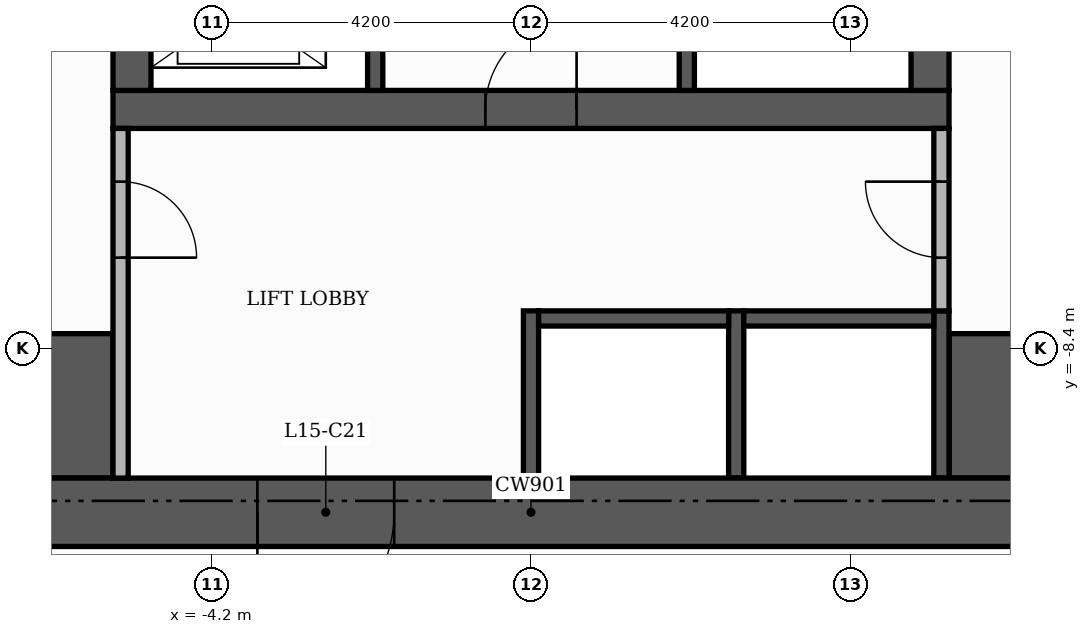
"""IFC4 building model, lengths in metres.
Left out: names, types, materials, properties, quantities, classifications, styles, units other than length and angle.
Written with IfcOpenShell. Run it as: python <this file> out.ifc"""

import sys

from ifc_helpers import new_model, si_unit, direction, frame, frame_2d, origin, place, context, subcontext, project, spatial, rectangle, extrude, element, fill, save


model = new_model("IFC4")
c1 = context("Model", 3, precision=1e-05, world=origin(), true_north=direction((0.0, 1.0)))
c2 = subcontext(c1, "Body", "Model", "MODEL_VIEW")
j1 = project(units=[si_unit("LENGTHUNIT", "METRE"), si_unit("PLANEANGLEUNIT", "RADIAN")], contexts=[c1])
p1 = place(None, origin())
s1 = spatial("IfcSite", under=j1, at=p1, CompositionType="ELEMENT")
p2 = place(p1, origin())
s2 = spatial("IfcBuilding", under=s1, at=p2, CompositionType="ELEMENT")
p3 = place(p2, frame((0.0, 0.0, 66.0)))
s3 = spatial("IfcBuildingStorey", under=s2, at=p3, CompositionType="ELEMENT", Elevation=66.0)
p4 = place(p3, frame((-5.5, -5.25, 0.0), z_axis=(0.0, 0.0, 1.0), x_axis=(1.0, 0.0, 0.0)))
e1 = element("IfcWall", 1, at=p4, inside=s3, PredefinedType="SHEAR", context=c2, shape_type="SweptSolid", body=[
    extrude(rectangle(XDim=11.0, YDim=0.5, at=frame_2d((5.5, 0.0))), origin(), (0.0, 0.0, 1.0), 3.48),
])
p5 = place(p4, frame((4.9, 0.0, 0.0)))
e2 = element("IfcOpeningElement", 2, at=p5, cuts=e1, PredefinedType="OPENING", context=c2, shape_type="SweptSolid", body=[
    extrude(rectangle(XDim=1.2, YDim=2.1, at=frame_2d((0.6, 1.05))), frame((0.0, 0.26, 0.0), z_axis=(0.0, -1.0, 0.0), x_axis=(1.0, 0.0, 0.0)), (0.0, 0.0, 1.0), 0.52),
])
for number, where, z_axis, x_axis in (
    (3, (-5.25, -5.0, 0.0), (0.0, 0.0, 1.0), (0.0, 1.0, 0.0)),
    (4, (5.25, -5.0, 0.0), (0.0, 0.0, 1.0), (0.0, 1.0, 0.0)),
):
    element("IfcWall", number, at=place(p3, frame(where, z_axis=z_axis, x_axis=x_axis)), inside=s3, PredefinedType="SHEAR", context=c2, shape_type="SweptSolid", body=[
        extrude(rectangle(XDim=10.5, YDim=0.5, at=frame_2d((5.25, 0.0))), origin(), (0.0, 0.0, 1.0), 3.48),
    ])
for number, where, z_axis, x_axis in (
    (5, (-10.1, -9.15, 0.0), (0.0, 0.0, 1.0), (1.0, 0.0, 0.0)),
    (6, (5.5, -9.15, 0.0), (0.0, 0.0, 1.0), (1.0, 0.0, 0.0)),
):
    element("IfcWall", number, at=place(p3, frame(where, z_axis=z_axis, x_axis=x_axis)), inside=s3, PredefinedType="SHEAR", context=c2, shape_type="SweptSolid", body=[
        extrude(rectangle(XDim=4.6, YDim=1.9, at=frame_2d((2.3, 0.0))), origin(), (0.0, 0.0, 1.0), 3.48),
    ])
p6 = place(p3, frame((2.05, -5.0, 0.0), z_axis=(0.0, 0.0, 1.0), x_axis=(0.0, 1.0, 0.0)))
e7 = element("IfcWall", 7, at=p6, inside=s3, PredefinedType="SHEAR", context=c2, shape_type="SweptSolid", body=[
    extrude(rectangle(XDim=6.6, YDim=0.2, at=frame_2d((3.3, 0.0))), origin(), (0.0, 0.0, 1.0), 3.48),
])
p7 = place(p6, frame((5.25, 0.0, 0.0)))
e8 = element("IfcOpeningElement", 8, at=p7, cuts=e7, PredefinedType="OPENING", context=c2, shape_type="SweptSolid", body=[
    extrude(rectangle(XDim=1.0, YDim=2.1, at=frame_2d((0.5, 1.05))), frame((0.0, 0.11, 0.0), z_axis=(0.0, -1.0, 0.0), x_axis=(1.0, 0.0, 0.0)), (0.0, 0.0, 1.0), 0.22),
])
for number, where, z_axis, x_axis in (
    (9, (0.0, -10.1, 0.0), (0.0, 0.0, 1.0), (0.0, 1.0, 0.0)),
    (10, (2.7, -10.1, 0.0), (0.0, 0.0, 1.0), (0.0, 1.0, 0.0)),
    (11, (5.4, -10.1, 0.0), (0.0, 0.0, 1.0), (0.0, 1.0, 0.0)),
):
    element("IfcWall", number, at=place(p3, frame(where, z_axis=z_axis, x_axis=x_axis)), inside=s3, PredefinedType="SHEAR", context=c2, shape_type="SweptSolid", body=[
        extrude(rectangle(XDim=2.2, YDim=0.2, at=frame_2d((1.1, 0.0))), origin(), (0.0, 0.0, 1.0), 3.48),
    ])
for number, where, z_axis, x_axis in (
    (12, (0.1, -8.0, 0.0), (0.0, 0.0, 1.0), (1.0, 0.0, 0.0)),
    (13, (2.8, -8.0, 0.0), (0.0, 0.0, 1.0), (1.0, 0.0, 0.0)),
):
    element("IfcWall", number, at=place(p3, frame(where, z_axis=z_axis, x_axis=x_axis)), inside=s3, PredefinedType="SHEAR", context=c2, shape_type="SweptSolid", body=[
        extrude(rectangle(XDim=2.5, YDim=0.2, at=frame_2d((1.25, 0.0))), origin(), (0.0, 0.0, 1.0), 3.48),
    ])
p8 = place(p3, frame((-2.05, -5.0, 0.0), z_axis=(0.0, 0.0, 1.0), x_axis=(0.0, 1.0, 0.0)))
e14 = element("IfcWall", 14, at=p8, inside=s3, PredefinedType="SHEAR", context=c2, shape_type="SweptSolid", body=[
    extrude(rectangle(XDim=3.4, YDim=0.2, at=frame_2d((1.7, 0.0))), origin(), (0.0, 0.0, 1.0), 3.48),
])
p9 = place(p8, frame((0.55, 0.0, 0.0)))
e15 = element("IfcOpeningElement", 15, at=p9, cuts=e14, PredefinedType="OPENING", context=c2, shape_type="SweptSolid", body=[
    extrude(rectangle(XDim=1.1, YDim=2.1, at=frame_2d((0.55, 1.05))), frame((0.0, 0.11, 0.0), z_axis=(0.0, -1.0, 0.0), x_axis=(1.0, 0.0, 0.0)), (0.0, 0.0, 1.0), 0.22),
])
p10 = place(p8, frame((2.45, 0.0, 0.0)))
e16 = element("IfcOpeningElement", 16, at=p10, cuts=e14, PredefinedType="OPENING", context=c2, shape_type="SweptSolid", body=[
    extrude(rectangle(XDim=0.8, YDim=2.1, at=frame_2d((0.4, 1.05))), frame((0.0, 0.11, 0.0), z_axis=(0.0, -1.0, 0.0), x_axis=(1.0, 0.0, 0.0)), (0.0, 0.0, 1.0), 0.22),
])
p11 = place(p3, frame((-11.0, -10.55, 0.0), z_axis=(0.0, 0.0, 1.0), x_axis=(1.0, 0.0, 0.0)))
e17 = element("IfcWall", 17, at=p11, inside=s3, PredefinedType="SHEAR", context=c2, shape_type="SweptSolid", body=[
    extrude(rectangle(XDim=22.0, YDim=0.9, at=frame_2d((11.0, 0.0))), origin(), (0.0, 0.0, 1.0), 3.48),
])
p12 = place(p11, frame((7.4, 0.0, 0.0)))
e18 = element("IfcOpeningElement", 18, at=p12, cuts=e17, PredefinedType="OPENING", context=c2, shape_type="SweptSolid", body=[
    extrude(rectangle(XDim=1.8, YDim=2.2, at=frame_2d((0.9, 1.1))), frame((0.0, 0.46, 0.0), z_axis=(0.0, -1.0, 0.0), x_axis=(1.0, 0.0, 0.0)), (0.0, 0.0, 1.0), 0.92),
])
p13 = place(p3, frame((-5.4, -10.1, 0.0), z_axis=(0.0, 0.0, 1.0), x_axis=(0.0, 1.0, 0.0)))
e19 = element("IfcWall", 19, at=p13, inside=s3, PredefinedType="PARTITIONING", context=c2, shape_type="SweptSolid", body=[
    extrude(rectangle(XDim=4.6, YDim=0.2, at=frame_2d((2.3, 0.0))), origin(), (0.0, 0.0, 1.0), 3.48),
])
p14 = place(p13, frame((2.9, 0.0, 0.0)))
e20 = element("IfcOpeningElement", 20, at=p14, cuts=e19, PredefinedType="OPENING", context=c2, shape_type="SweptSolid", body=[
    extrude(rectangle(XDim=1.0, YDim=2.1, at=frame_2d((0.5, 1.05))), frame((0.0, 0.11, 0.0), z_axis=(0.0, -1.0, 0.0), x_axis=(1.0, 0.0, 0.0)), (0.0, 0.0, 1.0), 0.22),
])
p15 = place(p3, frame((5.4, -7.9, 0.0), z_axis=(0.0, 0.0, 1.0), x_axis=(0.0, 1.0, 0.0)))
e21 = element("IfcWall", 21, at=p15, inside=s3, PredefinedType="PARTITIONING", context=c2, shape_type="SweptSolid", body=[
    extrude(rectangle(XDim=2.4, YDim=0.2, at=frame_2d((1.2, 0.0))), origin(), (0.0, 0.0, 1.0), 3.48),
])
p16 = place(p15, frame((0.7, 0.0, 0.0)))
e22 = element("IfcOpeningElement", 22, at=p16, cuts=e21, PredefinedType="OPENING", context=c2, shape_type="SweptSolid", body=[
    extrude(rectangle(XDim=1.0, YDim=2.1, at=frame_2d((0.5, 1.05))), frame((0.0, 0.11, 0.0), z_axis=(0.0, -1.0, 0.0), x_axis=(1.0, 0.0, 0.0)), (0.0, 0.0, 1.0), 0.22),
])
p17 = place(p5, origin())
e23 = element("IfcDoor", 23, at=p17, inside=s3, OperationType="SINGLE_SWING_RIGHT", PredefinedType="DOOR", context=c2, shape_type="SweptSolid", body=[
    extrude(rectangle(XDim=1.2, YDim=2.1, at=frame_2d((0.6, 1.05))), frame((0.0, 0.025, 0.0), z_axis=(0.0, -1.0, 0.0), x_axis=(1.0, 0.0, 0.0)), (0.0, 0.0, 1.0), 0.05),
])
fill(e2, e23)
p18 = place(p14, frame((1.0, 0.0, 0.0), z_axis=(0.0, 0.0, 1.0), x_axis=(-1.0, 0.0, 0.0)))
e24 = element("IfcDoor", 24, at=p18, inside=s3, OperationType="SINGLE_SWING_LEFT", PredefinedType="DOOR", context=c2, shape_type="SweptSolid", body=[
    extrude(rectangle(XDim=1.0, YDim=2.1, at=frame_2d((0.5, 1.05))), frame((0.0, 0.025, 0.0), z_axis=(0.0, -1.0, 0.0), x_axis=(1.0, 0.0, 0.0)), (0.0, 0.0, 1.0), 0.05),
])
fill(e20, e24)
p19 = place(p16, origin())
e25 = element("IfcDoor", 25, at=p19, inside=s3, OperationType="SINGLE_SWING_RIGHT", PredefinedType="DOOR", context=c2, shape_type="SweptSolid", body=[
    extrude(rectangle(XDim=1.0, YDim=2.1, at=frame_2d((0.5, 1.05))), frame((0.0, 0.025, 0.0), z_axis=(0.0, -1.0, 0.0), x_axis=(1.0, 0.0, 0.0)), (0.0, 0.0, 1.0), 0.05),
])
fill(e22, e25)
p20 = place(p12, frame((1.8, 0.0, 0.0), z_axis=(0.0, 0.0, 1.0), x_axis=(-1.0, 0.0, 0.0)))
e26 = element("IfcDoor", 26, at=p20, inside=s3, OperationType="DOUBLE_DOOR_SINGLE_SWING", PredefinedType="DOOR", context=c2, shape_type="SweptSolid", body=[
    extrude(rectangle(XDim=1.8, YDim=2.2, at=frame_2d((0.9, 1.1))), frame((0.0, 0.025, 0.0), z_axis=(0.0, -1.0, 0.0), x_axis=(1.0, 0.0, 0.0)), (0.0, 0.0, 1.0), 0.05),
])
fill(e18, e26)
save(model, sys.argv[1])
